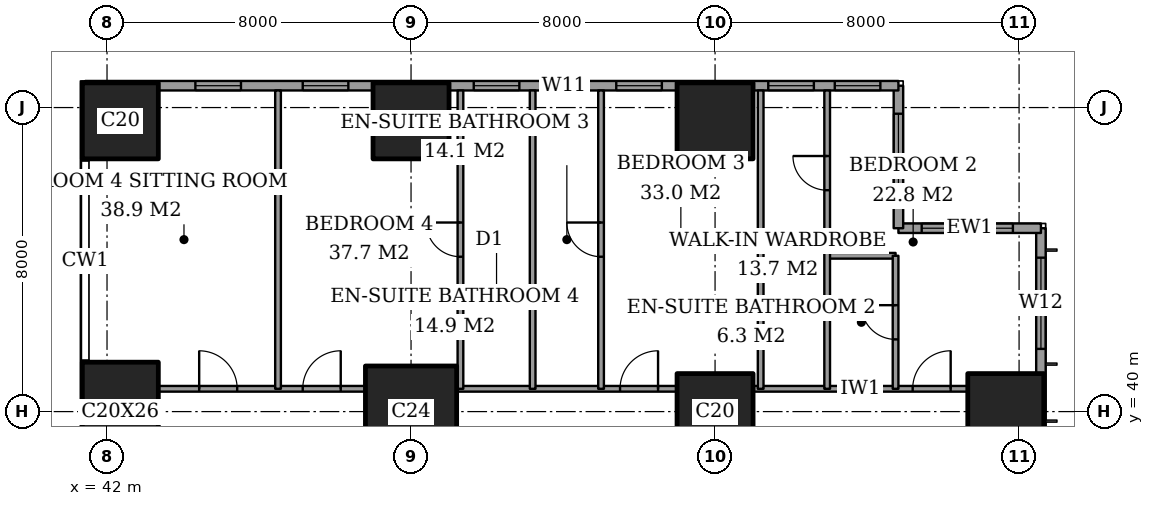
"""IFC4 building model, lengths in metres.
Left out: names, types, materials, properties, quantities, classifications, styles, units other than length and angle.
Written with IfcOpenShell. Run it as: python <this file> out.ifc"""

import sys

from ifc_helpers import new_model, si_unit, direction, frame, frame_2d, origin, origin_2d, place, context, subcontext, project, spatial, rectangle, extrude, element, fill, save


model = new_model("IFC4")
c1 = context("Model", 3, precision=1e-05, world=origin(), true_north=direction((0.0, 1.0)))
c2 = subcontext(c1, "Body", "Model", "MODEL_VIEW")
j1 = project(units=[si_unit("LENGTHUNIT", "METRE"), si_unit("PLANEANGLEUNIT", "RADIAN")], contexts=[c1])
p1 = place(None, origin())
s1 = spatial("IfcSite", under=j1, at=p1, CompositionType="ELEMENT")
p2 = place(p1, origin())
s2 = spatial("IfcBuilding", under=s1, at=p2, CompositionType="ELEMENT")
p3 = place(p2, frame((0.0, 0.0, 139.4)))
s3 = spatial("IfcBuildingStorey", under=s2, at=p3, CompositionType="ELEMENT", Elevation=139.4)
p4 = place(p3, frame((42.35, 40.0, 0.0), z_axis=(0.0, 0.0, 1.0), x_axis=(1.0, 0.0, 0.0)))
e1 = element("IfcColumn", 1, at=p4, inside=s3, PredefinedType="COLUMN", context=c2, shape_type="SweptSolid", body=[
    extrude(rectangle(XDim=2.0, YDim=2.6, at=origin_2d()), origin(), (0.0, 0.0, 1.0), 3.6),
])
p5 = place(p3, frame((42.35, 47.65, 0.0), z_axis=(0.0, 0.0, 1.0), x_axis=(1.0, 0.0, 0.0)))
e2 = element("IfcColumn", 2, at=p5, inside=s3, PredefinedType="COLUMN", context=c2, shape_type="SweptSolid", body=[
    extrude(rectangle(XDim=2.0, YDim=2.0, at=origin_2d()), origin(), (0.0, 0.0, 1.0), 3.6),
])
p6 = place(p3, frame((50.0, 40.0, 0.0), z_axis=(0.0, 0.0, 1.0), x_axis=(1.0, 0.0, 0.0)))
e3 = element("IfcColumn", 3, at=p6, inside=s3, PredefinedType="COLUMN", context=c2, shape_type="SweptSolid", body=[
    extrude(rectangle(XDim=2.4, YDim=2.4, at=origin_2d()), origin(), (0.0, 0.0, 1.0), 3.6),
])
for number, where, z_axis, x_axis in (
    (4, (50.0, 47.65, 0.0), (0.0, 0.0, 1.0), (1.0, 0.0, 0.0)),
    (5, (58.0, 40.0, 0.0), (0.0, 0.0, 1.0), (1.0, 0.0, 0.0)),
    (6, (58.0, 47.65, 0.0), (0.0, 0.0, 1.0), (1.0, 0.0, 0.0)),
    (7, (65.65, 40.0, 0.0), (0.0, 0.0, 1.0), (1.0, 0.0, 0.0)),
):
    element("IfcColumn", number, at=place(p3, frame(where, z_axis=z_axis, x_axis=x_axis)), inside=s3, PredefinedType="COLUMN", context=c2, shape_type="SweptSolid", body=[
        extrude(rectangle(XDim=2.0, YDim=2.0, at=origin_2d()), origin(), (0.0, 0.0, 1.0), 3.6),
    ])
p7 = place(p3, frame((66.575, 3.175, 0.0), z_axis=(0.0, 0.0, 1.0), x_axis=(0.0, 1.0, 0.0)))
e8 = element("IfcWall", 8, at=p7, inside=s3, PredefinedType="SOLIDWALL", context=c2, shape_type="SweptSolid", body=[
    extrude(rectangle(XDim=41.65, YDim=0.25, at=frame_2d((20.825, 0.0))), origin(), (0.0, 0.0, 1.0), 3.6),
])
p8 = place(p7, frame((0.775, 0.0, 0.4)))
e9 = element("IfcOpeningElement", 9, at=p8, cuts=e8, PredefinedType="OPENING", context=c2, shape_type="SweptSolid", body=[
    extrude(rectangle(XDim=2.4, YDim=2.2, at=frame_2d((1.2, 1.1))), frame((0.0, 0.135, 0.0), z_axis=(0.0, -1.0, 0.0), x_axis=(1.0, 0.0, 0.0)), (0.0, 0.0, 1.0), 0.27),
])
p9 = place(p7, frame((6.1, 0.0, 0.4)))
e10 = element("IfcOpeningElement", 10, at=p9, cuts=e8, PredefinedType="OPENING", context=c2, shape_type="SweptSolid", body=[
    extrude(rectangle(XDim=1.2, YDim=2.2, at=frame_2d((0.6, 1.1))), frame((0.0, 0.135, 0.0), z_axis=(0.0, -1.0, 0.0), x_axis=(1.0, 0.0, 0.0)), (0.0, 0.0, 1.0), 0.27),
])
p10 = place(p7, frame((8.275, 0.0, 0.4)))
e11 = element("IfcOpeningElement", 11, at=p10, cuts=e8, PredefinedType="OPENING", context=c2, shape_type="SweptSolid", body=[
    extrude(rectangle(XDim=2.4, YDim=2.2, at=frame_2d((1.2, 1.1))), frame((0.0, 0.135, 0.0), z_axis=(0.0, -1.0, 0.0), x_axis=(1.0, 0.0, 0.0)), (0.0, 0.0, 1.0), 0.27),
])
p11 = place(p7, frame((15.775, 0.0, 0.4)))
e12 = element("IfcOpeningElement", 12, at=p11, cuts=e8, PredefinedType="OPENING", context=c2, shape_type="SweptSolid", body=[
    extrude(rectangle(XDim=2.4, YDim=2.2, at=frame_2d((1.2, 1.1))), frame((0.0, 0.135, 0.0), z_axis=(0.0, -1.0, 0.0), x_axis=(1.0, 0.0, 0.0)), (0.0, 0.0, 1.0), 0.27),
])
p12 = place(p7, frame((23.475, 0.0, 0.4)))
e13 = element("IfcOpeningElement", 13, at=p12, cuts=e8, PredefinedType="OPENING", context=c2, shape_type="SweptSolid", body=[
    extrude(rectangle(XDim=2.4, YDim=2.2, at=frame_2d((1.2, 1.1))), frame((0.0, 0.135, 0.0), z_axis=(0.0, -1.0, 0.0), x_axis=(1.0, 0.0, 0.0)), (0.0, 0.0, 1.0), 0.27),
])
p13 = place(p7, frame((30.975, 0.0, 0.4)))
e14 = element("IfcOpeningElement", 14, at=p13, cuts=e8, PredefinedType="OPENING", context=c2, shape_type="SweptSolid", body=[
    extrude(rectangle(XDim=2.4, YDim=2.2, at=frame_2d((1.2, 1.1))), frame((0.0, 0.135, 0.0), z_axis=(0.0, -1.0, 0.0), x_axis=(1.0, 0.0, 0.0)), (0.0, 0.0, 1.0), 0.27),
])
p14 = place(p7, frame((34.5, 0.0, 0.4)))
e15 = element("IfcOpeningElement", 15, at=p14, cuts=e8, PredefinedType="OPENING", context=c2, shape_type="SweptSolid", body=[
    extrude(rectangle(XDim=1.2, YDim=2.2, at=frame_2d((0.6, 1.1))), frame((0.0, 0.135, 0.0), z_axis=(0.0, -1.0, 0.0), x_axis=(1.0, 0.0, 0.0)), (0.0, 0.0, 1.0), 0.27),
])
p15 = place(p7, frame((38.475, 0.0, 0.4)))
e16 = element("IfcOpeningElement", 16, at=p15, cuts=e8, PredefinedType="OPENING", context=c2, shape_type="SweptSolid", body=[
    extrude(rectangle(XDim=2.4, YDim=2.2, at=frame_2d((1.2, 1.1))), frame((0.0, 0.135, 0.0), z_axis=(0.0, -1.0, 0.0), x_axis=(1.0, 0.0, 0.0)), (0.0, 0.0, 1.0), 0.27),
])
p16 = place(p3, frame((66.575, 44.825, 0.0), z_axis=(0.0, 0.0, 1.0), x_axis=(-1.0, 0.0, 0.0)))
e17 = element("IfcWall", 17, at=p16, inside=s3, PredefinedType="SOLIDWALL", context=c2, shape_type="SweptSolid", body=[
    extrude(rectangle(XDim=3.75, YDim=0.25, at=frame_2d((1.875, 0.0))), origin(), (0.0, 0.0, 1.0), 3.6),
])
p17 = place(p16, frame((0.738, 0.0, 0.4)))
e18 = element("IfcOpeningElement", 18, at=p17, cuts=e17, PredefinedType="OPENING", context=c2, shape_type="SweptSolid", body=[
    extrude(rectangle(XDim=2.4, YDim=2.2, at=frame_2d((1.2, 1.1))), frame((0.0, 0.135, 0.0), z_axis=(0.0, -1.0, 0.0), x_axis=(1.0, 0.0, 0.0)), (0.0, 0.0, 1.0), 0.27),
])
p18 = place(p3, frame((62.825, 44.825, 0.0), z_axis=(0.0, 0.0, 1.0), x_axis=(0.0, 1.0, 0.0)))
e19 = element("IfcWall", 19, at=p18, inside=s3, PredefinedType="SOLIDWALL", context=c2, shape_type="SweptSolid", body=[
    extrude(rectangle(XDim=3.75, YDim=0.25, at=frame_2d((1.875, 0.0))), origin(), (0.0, 0.0, 1.0), 3.6),
])
p19 = place(p18, frame((0.613, 0.0, 0.4)))
e20 = element("IfcOpeningElement", 20, at=p19, cuts=e19, PredefinedType="OPENING", context=c2, shape_type="SweptSolid", body=[
    extrude(rectangle(XDim=2.4, YDim=2.2, at=frame_2d((1.2, 1.1))), frame((0.0, 0.135, 0.0), z_axis=(0.0, -1.0, 0.0), x_axis=(1.0, 0.0, 0.0)), (0.0, 0.0, 1.0), 0.27),
])
p20 = place(p3, frame((62.825, 48.575, 0.0), z_axis=(0.0, 0.0, 1.0), x_axis=(-1.0, 0.0, 0.0)))
e21 = element("IfcWall", 21, at=p20, inside=s3, PredefinedType="SOLIDWALL", context=c2, shape_type="SweptSolid", body=[
    extrude(rectangle(XDim=21.4, YDim=0.25, at=frame_2d((10.7, 0.0))), origin(), (0.0, 0.0, 1.0), 3.6),
])
p21 = place(p20, frame((0.475, 0.0, 0.4)))
e22 = element("IfcOpeningElement", 22, at=p21, cuts=e21, PredefinedType="OPENING", context=c2, shape_type="SweptSolid", body=[
    extrude(rectangle(XDim=1.2, YDim=2.2, at=frame_2d((0.6, 1.1))), frame((0.0, 0.135, 0.0), z_axis=(0.0, -1.0, 0.0), x_axis=(1.0, 0.0, 0.0)), (0.0, 0.0, 1.0), 0.27),
])
p22 = place(p20, frame((2.225, 0.0, 0.4)))
e23 = element("IfcOpeningElement", 23, at=p22, cuts=e21, PredefinedType="OPENING", context=c2, shape_type="SweptSolid", body=[
    extrude(rectangle(XDim=1.2, YDim=2.2, at=frame_2d((0.6, 1.1))), frame((0.0, 0.135, 0.0), z_axis=(0.0, -1.0, 0.0), x_axis=(1.0, 0.0, 0.0)), (0.0, 0.0, 1.0), 0.27),
])
p23 = place(p20, frame((6.225, 0.0, 0.4)))
e24 = element("IfcOpeningElement", 24, at=p23, cuts=e21, PredefinedType="OPENING", context=c2, shape_type="SweptSolid", body=[
    extrude(rectangle(XDim=1.2, YDim=2.2, at=frame_2d((0.6, 1.1))), frame((0.0, 0.135, 0.0), z_axis=(0.0, -1.0, 0.0), x_axis=(1.0, 0.0, 0.0)), (0.0, 0.0, 1.0), 0.27),
])
p24 = place(p20, frame((8.2, 0.0, 0.4)))
e25 = element("IfcOpeningElement", 25, at=p24, cuts=e21, PredefinedType="OPENING", context=c2, shape_type="SweptSolid", body=[
    extrude(rectangle(XDim=1.2, YDim=2.2, at=frame_2d((0.6, 1.1))), frame((0.0, 0.135, 0.0), z_axis=(0.0, -1.0, 0.0), x_axis=(1.0, 0.0, 0.0)), (0.0, 0.0, 1.0), 0.27),
])
p25 = place(p20, frame((9.975, 0.0, 0.4)))
e26 = element("IfcOpeningElement", 26, at=p25, cuts=e21, PredefinedType="OPENING", context=c2, shape_type="SweptSolid", body=[
    extrude(rectangle(XDim=1.2, YDim=2.2, at=frame_2d((0.6, 1.1))), frame((0.0, 0.135, 0.0), z_axis=(0.0, -1.0, 0.0), x_axis=(1.0, 0.0, 0.0)), (0.0, 0.0, 1.0), 0.27),
])
p26 = place(p20, frame((14.475, 0.0, 0.4)))
e27 = element("IfcOpeningElement", 27, at=p26, cuts=e21, PredefinedType="OPENING", context=c2, shape_type="SweptSolid", body=[
    extrude(rectangle(XDim=1.2, YDim=2.2, at=frame_2d((0.6, 1.1))), frame((0.0, 0.135, 0.0), z_axis=(0.0, -1.0, 0.0), x_axis=(1.0, 0.0, 0.0)), (0.0, 0.0, 1.0), 0.27),
])
p27 = place(p20, frame((17.3, 0.0, 0.4)))
e28 = element("IfcOpeningElement", 28, at=p27, cuts=e21, PredefinedType="OPENING", context=c2, shape_type="SweptSolid", body=[
    extrude(rectangle(XDim=1.2, YDim=2.2, at=frame_2d((0.6, 1.1))), frame((0.0, 0.135, 0.0), z_axis=(0.0, -1.0, 0.0), x_axis=(1.0, 0.0, 0.0)), (0.0, 0.0, 1.0), 0.27),
])
p28 = place(p3, frame((43.35, 40.6, 0.0), z_axis=(0.0, 0.0, 1.0), x_axis=(1.0, 0.0, 0.0)))
e29 = element("IfcWall", 29, at=p28, inside=s3, PredefinedType="PARTITIONING", context=c2, shape_type="SweptSolid", body=[
    extrude(rectangle(XDim=5.45, YDim=0.15, at=frame_2d((2.725, 0.0))), origin(), (0.0, 0.0, 1.0), 3.35),
])
p29 = place(p28, frame((3.8, 0.0, 0.0)))
e30 = element("IfcOpeningElement", 30, at=p29, cuts=e29, PredefinedType="OPENING", context=c2, shape_type="SweptSolid", body=[
    extrude(rectangle(XDim=1.0, YDim=2.1, at=frame_2d((0.5, 1.05))), frame((0.0, 0.085, 0.0), z_axis=(0.0, -1.0, 0.0), x_axis=(1.0, 0.0, 0.0)), (0.0, 0.0, 1.0), 0.17),
])
p30 = place(p28, frame((1.075, 0.0, 0.0)))
e31 = element("IfcOpeningElement", 31, at=p30, cuts=e29, PredefinedType="OPENING", context=c2, shape_type="SweptSolid", body=[
    extrude(rectangle(XDim=1.0, YDim=2.1, at=frame_2d((0.5, 1.05))), frame((0.0, 0.085, 0.0), z_axis=(0.0, -1.0, 0.0), x_axis=(1.0, 0.0, 0.0)), (0.0, 0.0, 1.0), 0.17),
])
p31 = place(p3, frame((51.2, 40.6, 0.0), z_axis=(0.0, 0.0, 1.0), x_axis=(1.0, 0.0, 0.0)))
e32 = element("IfcWall", 32, at=p31, inside=s3, PredefinedType="PARTITIONING", context=c2, shape_type="SweptSolid", body=[
    extrude(rectangle(XDim=5.8, YDim=0.15, at=frame_2d((2.9, 0.0))), origin(), (0.0, 0.0, 1.0), 3.35),
])
p32 = place(p31, frame((4.3, 0.0, 0.0)))
e33 = element("IfcOpeningElement", 33, at=p32, cuts=e32, PredefinedType="OPENING", context=c2, shape_type="SweptSolid", body=[
    extrude(rectangle(XDim=1.0, YDim=2.1, at=frame_2d((0.5, 1.05))), frame((0.0, 0.085, 0.0), z_axis=(0.0, -1.0, 0.0), x_axis=(1.0, 0.0, 0.0)), (0.0, 0.0, 1.0), 0.17),
])
p33 = place(p3, frame((59.0, 40.6, 0.0), z_axis=(0.0, 0.0, 1.0), x_axis=(1.0, 0.0, 0.0)))
e34 = element("IfcWall", 34, at=p33, inside=s3, PredefinedType="PARTITIONING", context=c2, shape_type="SweptSolid", body=[
    extrude(rectangle(XDim=5.65, YDim=0.15, at=frame_2d((2.825, 0.0))), origin(), (0.0, 0.0, 1.0), 3.35),
])
p34 = place(p33, frame((4.2, 0.0, 0.0)))
e35 = element("IfcOpeningElement", 35, at=p34, cuts=e34, PredefinedType="OPENING", context=c2, shape_type="SweptSolid", body=[
    extrude(rectangle(XDim=1.0, YDim=2.1, at=frame_2d((0.5, 1.05))), frame((0.0, 0.085, 0.0), z_axis=(0.0, -1.0, 0.0), x_axis=(1.0, 0.0, 0.0)), (0.0, 0.0, 1.0), 0.17),
])
p35 = place(p3, frame((60.95, 44.1, 0.0), z_axis=(0.0, 0.0, 1.0), x_axis=(1.0, 0.0, 0.0)))
e36 = element("IfcWall", 36, at=p35, inside=s3, PredefinedType="PARTITIONING", context=c2, shape_type="SweptSolid", body=[
    extrude(rectangle(XDim=1.8, YDim=0.15, at=frame_2d((0.9, 0.0))), origin(), (0.0, 0.0, 1.0), 3.35),
])
p36 = place(p3, frame((46.5, 40.6, 0.0), z_axis=(0.0, 0.0, 1.0), x_axis=(0.0, 1.0, 0.0)))
e37 = element("IfcWall", 37, at=p36, inside=s3, PredefinedType="PARTITIONING", context=c2, shape_type="SweptSolid", body=[
    extrude(rectangle(XDim=7.85, YDim=0.15, at=frame_2d((3.925, 0.0))), origin(), (0.0, 0.0, 1.0), 3.35),
])
p37 = place(p3, frame((51.3, 40.6, 0.0), z_axis=(0.0, 0.0, 1.0), x_axis=(0.0, 1.0, 0.0)))
e38 = element("IfcWall", 38, at=p37, inside=s3, PredefinedType="PARTITIONING", context=c2, shape_type="SweptSolid", body=[
    extrude(rectangle(XDim=7.85, YDim=0.15, at=frame_2d((3.925, 0.0))), origin(), (0.0, 0.0, 1.0), 3.35),
])
p38 = place(p37, frame((3.475, 0.0, 0.0)))
e39 = element("IfcOpeningElement", 39, at=p38, cuts=e38, PredefinedType="OPENING", context=c2, shape_type="SweptSolid", body=[
    extrude(rectangle(XDim=0.9, YDim=2.1, at=frame_2d((0.45, 1.05))), frame((0.0, 0.085, 0.0), z_axis=(0.0, -1.0, 0.0), x_axis=(1.0, 0.0, 0.0)), (0.0, 0.0, 1.0), 0.17),
])
p39 = place(p3, frame((53.2, 40.6, 0.0), z_axis=(0.0, 0.0, 1.0), x_axis=(0.0, 1.0, 0.0)))
e40 = element("IfcWall", 40, at=p39, inside=s3, PredefinedType="PARTITIONING", context=c2, shape_type="SweptSolid", body=[
    extrude(rectangle(XDim=7.85, YDim=0.15, at=frame_2d((3.925, 0.0))), origin(), (0.0, 0.0, 1.0), 3.35),
])
p40 = place(p3, frame((55.0, 40.6, 0.0), z_axis=(0.0, 0.0, 1.0), x_axis=(0.0, 1.0, 0.0)))
e41 = element("IfcWall", 41, at=p40, inside=s3, PredefinedType="PARTITIONING", context=c2, shape_type="SweptSolid", body=[
    extrude(rectangle(XDim=7.85, YDim=0.15, at=frame_2d((3.925, 0.0))), origin(), (0.0, 0.0, 1.0), 3.35),
])
p41 = place(p40, frame((3.475, 0.0, 0.0)))
e42 = element("IfcOpeningElement", 42, at=p41, cuts=e41, PredefinedType="OPENING", context=c2, shape_type="SweptSolid", body=[
    extrude(rectangle(XDim=0.9, YDim=2.1, at=frame_2d((0.45, 1.05))), frame((0.0, 0.085, 0.0), z_axis=(0.0, -1.0, 0.0), x_axis=(1.0, 0.0, 0.0)), (0.0, 0.0, 1.0), 0.17),
])
p42 = place(p3, frame((59.2, 40.6, 0.0), z_axis=(0.0, 0.0, 1.0), x_axis=(0.0, 1.0, 0.0)))
e43 = element("IfcWall", 43, at=p42, inside=s3, PredefinedType="PARTITIONING", context=c2, shape_type="SweptSolid", body=[
    extrude(rectangle(XDim=7.85, YDim=0.15, at=frame_2d((3.925, 0.0))), origin(), (0.0, 0.0, 1.0), 3.35),
])
p43 = place(p3, frame((60.95, 40.6, 0.0), z_axis=(0.0, 0.0, 1.0), x_axis=(0.0, 1.0, 0.0)))
e44 = element("IfcWall", 44, at=p43, inside=s3, PredefinedType="PARTITIONING", context=c2, shape_type="SweptSolid", body=[
    extrude(rectangle(XDim=7.85, YDim=0.15, at=frame_2d((3.925, 0.0))), origin(), (0.0, 0.0, 1.0), 3.35),
])
p44 = place(p43, frame((5.225, 0.0, 0.0)))
e45 = element("IfcOpeningElement", 45, at=p44, cuts=e44, PredefinedType="OPENING", context=c2, shape_type="SweptSolid", body=[
    extrude(rectangle(XDim=0.9, YDim=2.1, at=frame_2d((0.45, 1.05))), frame((0.0, 0.085, 0.0), z_axis=(0.0, -1.0, 0.0), x_axis=(1.0, 0.0, 0.0)), (0.0, 0.0, 1.0), 0.17),
])
p45 = place(p3, frame((62.75, 40.6, 0.0), z_axis=(0.0, 0.0, 1.0), x_axis=(0.0, 1.0, 0.0)))
e46 = element("IfcWall", 46, at=p45, inside=s3, PredefinedType="PARTITIONING", context=c2, shape_type="SweptSolid", body=[
    extrude(rectangle(XDim=3.5, YDim=0.15, at=frame_2d((1.75, 0.0))), origin(), (0.0, 0.0, 1.0), 3.35),
])
p46 = place(p45, frame((1.3, 0.0, 0.0)))
e47 = element("IfcOpeningElement", 47, at=p46, cuts=e46, PredefinedType="OPENING", context=c2, shape_type="SweptSolid", body=[
    extrude(rectangle(XDim=0.9, YDim=2.1, at=frame_2d((0.45, 1.05))), frame((0.0, 0.085, 0.0), z_axis=(0.0, -1.0, 0.0), x_axis=(1.0, 0.0, 0.0)), (0.0, 0.0, 1.0), 0.17),
])
p47 = place(p15, origin())
e48 = element("IfcWindow", 48, at=p47, inside=s3, PartitioningType="SINGLE_PANEL", PredefinedType="WINDOW", context=c2, shape_type="SweptSolid", body=[
    extrude(rectangle(XDim=2.4, YDim=2.2, at=frame_2d((1.2, 1.1))), frame((0.0, 0.03, 0.0), z_axis=(0.0, -1.0, 0.0), x_axis=(1.0, 0.0, 0.0)), (0.0, 0.0, 1.0), 0.06),
])
fill(e16, e48)
p48 = place(p17, origin())
e49 = element("IfcWindow", 49, at=p48, inside=s3, PartitioningType="SINGLE_PANEL", PredefinedType="WINDOW", context=c2, shape_type="SweptSolid", body=[
    extrude(rectangle(XDim=2.4, YDim=2.2, at=frame_2d((1.2, 1.1))), frame((0.0, 0.03, 0.0), z_axis=(0.0, -1.0, 0.0), x_axis=(1.0, 0.0, 0.0)), (0.0, 0.0, 1.0), 0.06),
])
fill(e18, e49)
p49 = place(p19, origin())
e50 = element("IfcWindow", 50, at=p49, inside=s3, PartitioningType="SINGLE_PANEL", PredefinedType="WINDOW", context=c2, shape_type="SweptSolid", body=[
    extrude(rectangle(XDim=2.4, YDim=2.2, at=frame_2d((1.2, 1.1))), frame((0.0, 0.03, 0.0), z_axis=(0.0, -1.0, 0.0), x_axis=(1.0, 0.0, 0.0)), (0.0, 0.0, 1.0), 0.06),
])
fill(e20, e50)
p50 = place(p21, origin())
e51 = element("IfcWindow", 51, at=p50, inside=s3, PartitioningType="SINGLE_PANEL", PredefinedType="WINDOW", context=c2, shape_type="SweptSolid", body=[
    extrude(rectangle(XDim=1.2, YDim=2.2, at=frame_2d((0.6, 1.1))), frame((0.0, 0.03, 0.0), z_axis=(0.0, -1.0, 0.0), x_axis=(1.0, 0.0, 0.0)), (0.0, 0.0, 1.0), 0.06),
])
fill(e22, e51)
p51 = place(p22, origin())
e52 = element("IfcWindow", 52, at=p51, inside=s3, PartitioningType="SINGLE_PANEL", PredefinedType="WINDOW", context=c2, shape_type="SweptSolid", body=[
    extrude(rectangle(XDim=1.2, YDim=2.2, at=frame_2d((0.6, 1.1))), frame((0.0, 0.03, 0.0), z_axis=(0.0, -1.0, 0.0), x_axis=(1.0, 0.0, 0.0)), (0.0, 0.0, 1.0), 0.06),
])
fill(e23, e52)
p52 = place(p23, origin())
e53 = element("IfcWindow", 53, at=p52, inside=s3, PartitioningType="SINGLE_PANEL", PredefinedType="WINDOW", context=c2, shape_type="SweptSolid", body=[
    extrude(rectangle(XDim=1.2, YDim=2.2, at=frame_2d((0.6, 1.1))), frame((0.0, 0.03, 0.0), z_axis=(0.0, -1.0, 0.0), x_axis=(1.0, 0.0, 0.0)), (0.0, 0.0, 1.0), 0.06),
])
fill(e24, e53)
p53 = place(p24, origin())
e54 = element("IfcWindow", 54, at=p53, inside=s3, PartitioningType="SINGLE_PANEL", PredefinedType="WINDOW", context=c2, shape_type="SweptSolid", body=[
    extrude(rectangle(XDim=1.2, YDim=2.2, at=frame_2d((0.6, 1.1))), frame((0.0, 0.03, 0.0), z_axis=(0.0, -1.0, 0.0), x_axis=(1.0, 0.0, 0.0)), (0.0, 0.0, 1.0), 0.06),
])
fill(e25, e54)
p54 = place(p25, origin())
e55 = element("IfcWindow", 55, at=p54, inside=s3, PartitioningType="SINGLE_PANEL", PredefinedType="WINDOW", context=c2, shape_type="SweptSolid", body=[
    extrude(rectangle(XDim=1.2, YDim=2.2, at=frame_2d((0.6, 1.1))), frame((0.0, 0.03, 0.0), z_axis=(0.0, -1.0, 0.0), x_axis=(1.0, 0.0, 0.0)), (0.0, 0.0, 1.0), 0.06),
])
fill(e26, e55)
p55 = place(p26, origin())
e56 = element("IfcWindow", 56, at=p55, inside=s3, PartitioningType="SINGLE_PANEL", PredefinedType="WINDOW", context=c2, shape_type="SweptSolid", body=[
    extrude(rectangle(XDim=1.2, YDim=2.2, at=frame_2d((0.6, 1.1))), frame((0.0, 0.03, 0.0), z_axis=(0.0, -1.0, 0.0), x_axis=(1.0, 0.0, 0.0)), (0.0, 0.0, 1.0), 0.06),
])
fill(e27, e56)
p56 = place(p27, origin())
e57 = element("IfcWindow", 57, at=p56, inside=s3, PartitioningType="SINGLE_PANEL", PredefinedType="WINDOW", context=c2, shape_type="SweptSolid", body=[
    extrude(rectangle(XDim=1.2, YDim=2.2, at=frame_2d((0.6, 1.1))), frame((0.0, 0.03, 0.0), z_axis=(0.0, -1.0, 0.0), x_axis=(1.0, 0.0, 0.0)), (0.0, 0.0, 1.0), 0.06),
])
fill(e28, e57)
p57 = place(p46, origin())
e58 = element("IfcDoor", 58, at=p57, inside=s3, OperationType="SINGLE_SWING_LEFT", PredefinedType="DOOR", context=c2, shape_type="SweptSolid", body=[
    extrude(rectangle(XDim=0.9, YDim=2.1, at=frame_2d((0.45, 1.05))), frame((0.0, 0.025, 0.0), z_axis=(0.0, -1.0, 0.0), x_axis=(1.0, 0.0, 0.0)), (0.0, 0.0, 1.0), 0.05),
])
fill(e47, e58)
p58 = place(p34, origin())
e59 = element("IfcDoor", 59, at=p58, inside=s3, OperationType="SINGLE_SWING_LEFT", PredefinedType="DOOR", context=c2, shape_type="SweptSolid", body=[
    extrude(rectangle(XDim=1.0, YDim=2.1, at=frame_2d((0.5, 1.05))), frame((0.0, 0.025, 0.0), z_axis=(0.0, -1.0, 0.0), x_axis=(1.0, 0.0, 0.0)), (0.0, 0.0, 1.0), 0.05),
])
fill(e35, e59)
p59 = place(p44, origin())
e60 = element("IfcDoor", 60, at=p59, inside=s3, OperationType="SINGLE_SWING_LEFT", PredefinedType="DOOR", context=c2, shape_type="SweptSolid", body=[
    extrude(rectangle(XDim=0.9, YDim=2.1, at=frame_2d((0.45, 1.05))), frame((0.0, 0.025, 0.0), z_axis=(0.0, -1.0, 0.0), x_axis=(1.0, 0.0, 0.0)), (0.0, 0.0, 1.0), 0.05),
])
fill(e45, e60)
p60 = place(p32, origin())
e61 = element("IfcDoor", 61, at=p60, inside=s3, OperationType="SINGLE_SWING_LEFT", PredefinedType="DOOR", context=c2, shape_type="SweptSolid", body=[
    extrude(rectangle(XDim=1.0, YDim=2.1, at=frame_2d((0.5, 1.05))), frame((0.0, 0.025, 0.0), z_axis=(0.0, -1.0, 0.0), x_axis=(1.0, 0.0, 0.0)), (0.0, 0.0, 1.0), 0.05),
])
fill(e33, e61)
p61 = place(p41, origin())
e62 = element("IfcDoor", 62, at=p61, inside=s3, OperationType="SINGLE_SWING_LEFT", PredefinedType="DOOR", context=c2, shape_type="SweptSolid", body=[
    extrude(rectangle(XDim=0.9, YDim=2.1, at=frame_2d((0.45, 1.05))), frame((0.0, 0.025, 0.0), z_axis=(0.0, -1.0, 0.0), x_axis=(1.0, 0.0, 0.0)), (0.0, 0.0, 1.0), 0.05),
])
fill(e42, e62)
p62 = place(p38, origin())
e63 = element("IfcDoor", 63, at=p62, inside=s3, OperationType="SINGLE_SWING_LEFT", PredefinedType="DOOR", context=c2, shape_type="SweptSolid", body=[
    extrude(rectangle(XDim=0.9, YDim=2.1, at=frame_2d((0.45, 1.05))), frame((0.0, 0.025, 0.0), z_axis=(0.0, -1.0, 0.0), x_axis=(1.0, 0.0, 0.0)), (0.0, 0.0, 1.0), 0.05),
])
fill(e39, e63)
p63 = place(p29, origin())
e64 = element("IfcDoor", 64, at=p63, inside=s3, OperationType="SINGLE_SWING_LEFT", PredefinedType="DOOR", context=c2, shape_type="SweptSolid", body=[
    extrude(rectangle(XDim=1.0, YDim=2.1, at=frame_2d((0.5, 1.05))), frame((0.0, 0.025, 0.0), z_axis=(0.0, -1.0, 0.0), x_axis=(1.0, 0.0, 0.0)), (0.0, 0.0, 1.0), 0.05),
])
fill(e30, e64)
p64 = place(p30, origin())
e65 = element("IfcDoor", 65, at=p64, inside=s3, OperationType="SINGLE_SWING_RIGHT", PredefinedType="DOOR", context=c2, shape_type="SweptSolid", body=[
    extrude(rectangle(XDim=1.0, YDim=2.1, at=frame_2d((0.5, 1.05))), frame((0.0, 0.025, 0.0), z_axis=(0.0, -1.0, 0.0), x_axis=(1.0, 0.0, 0.0)), (0.0, 0.0, 1.0), 0.05),
])
fill(e31, e65)
save(model, sys.argv[1])
